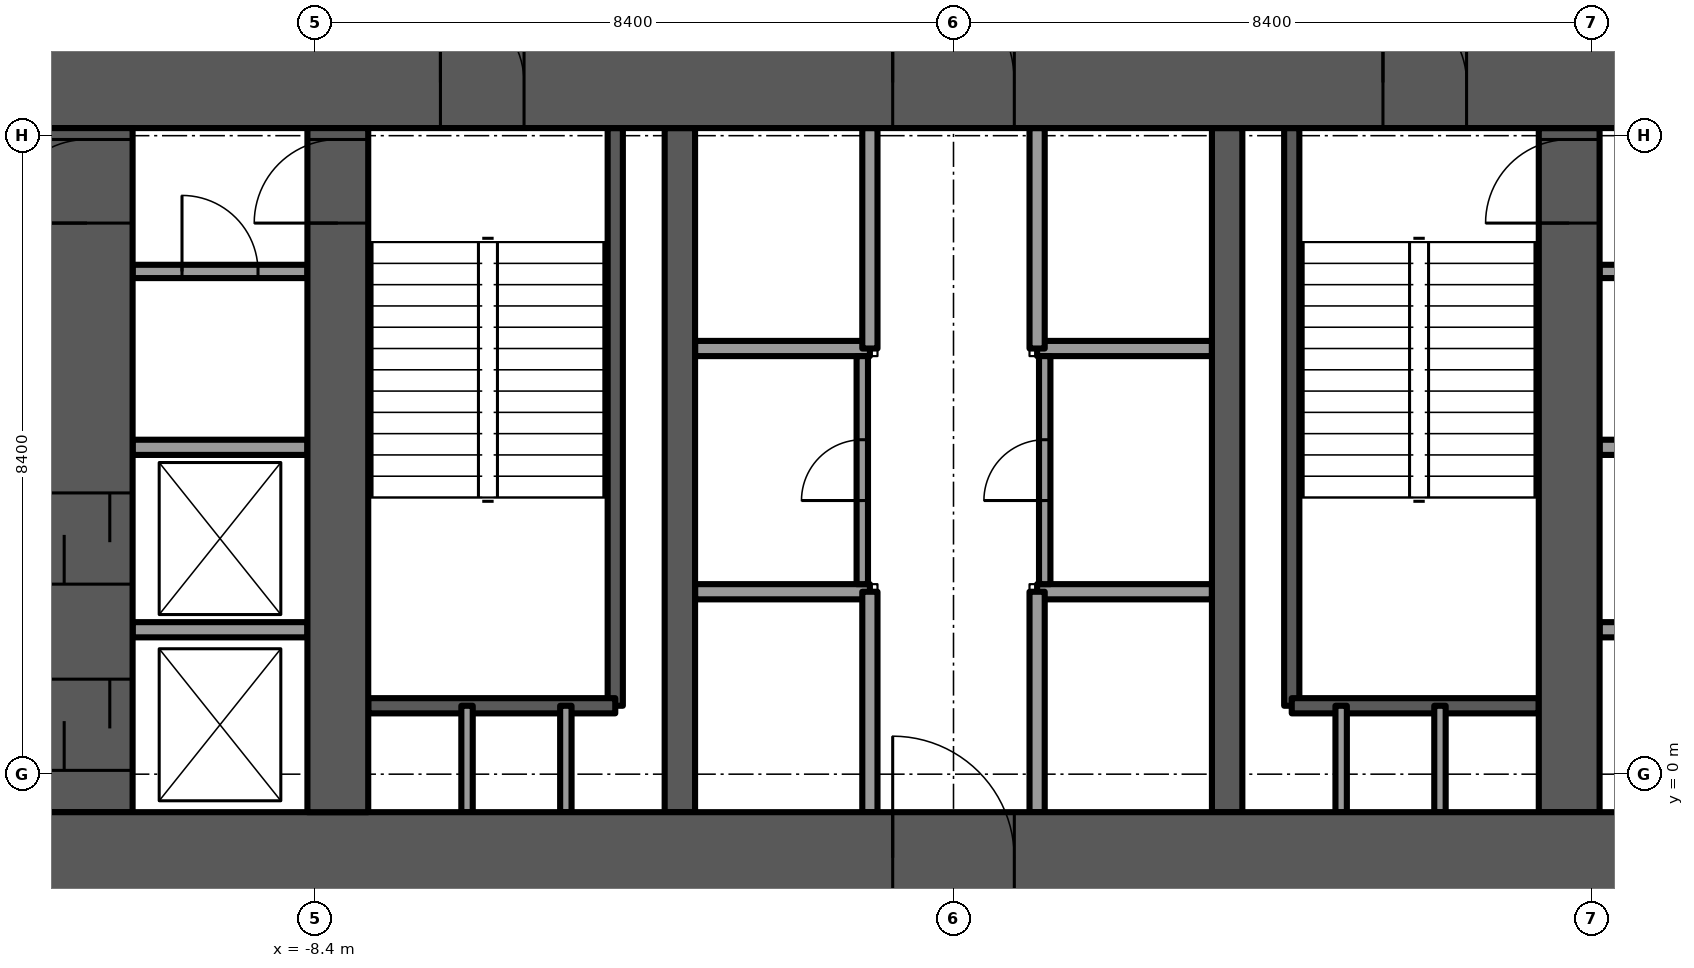
"""IFC4 building model, lengths in metres.
Left out: names, types, materials, properties, quantities, classifications, styles, units other than length and angle.
Written with IfcOpenShell. Run it as: python <this file> out.ifc"""

import sys

from ifc_helpers import new_model, si_unit, direction, frame, frame_2d, origin, place, context, subcontext, project, spatial, rectangle, extrude, element, fill, save


model = new_model("IFC4")
c1 = context("Model", 3, precision=1e-05, world=origin(), true_north=direction((0.0, 1.0)))
c2 = subcontext(c1, "Body", "Model", "MODEL_VIEW")
j1 = project(units=[si_unit("LENGTHUNIT", "METRE"), si_unit("PLANEANGLEUNIT", "RADIAN")], contexts=[c1])
p1 = place(None, origin())
s1 = spatial("IfcSite", under=j1, at=p1, CompositionType="ELEMENT")
p2 = place(p1, origin())
s2 = spatial("IfcBuilding", under=s1, at=p2, CompositionType="ELEMENT")
p3 = place(p2, frame((0.0, 0.0, 14.5)))
s3 = spatial("IfcBuildingStorey", under=s2, at=p3, CompositionType="ELEMENT", Elevation=14.5)
p4 = place(p3, frame((-12.0, -1.1, -0.3), z_axis=(0.0, 0.0, 1.0), x_axis=(1.0, 0.0, 0.0)))
e1 = element("IfcWall", 1, at=p4, inside=s3, PredefinedType="SHEAR", context=c2, shape_type="SweptSolid", body=[
    extrude(rectangle(XDim=24.0, YDim=1.2, at=frame_2d((12.0, 0.0))), origin(), (0.0, 0.0, 1.0), 4.5),
])
p5 = place(p4, frame((11.2, 0.0, 0.0)))
e2 = element("IfcOpeningElement", 2, at=p5, cuts=e1, PredefinedType="OPENING", context=c2, shape_type="SweptSolid", body=[
    extrude(rectangle(XDim=1.6, YDim=2.1, at=frame_2d((0.8, 1.05))), frame((0.0, 0.6, 0.0), z_axis=(0.0, -1.0, 0.0), x_axis=(1.0, 0.0, 0.0)), (0.0, 0.0, 1.0), 1.2),
])
p6 = place(p3, frame((-12.0, 9.1, -0.3), z_axis=(0.0, 0.0, 1.0), x_axis=(1.0, 0.0, 0.0)))
e3 = element("IfcWall", 3, at=p6, inside=s3, PredefinedType="SHEAR", context=c2, shape_type="SweptSolid", body=[
    extrude(rectangle(XDim=24.0, YDim=1.2, at=frame_2d((12.0, 0.0))), origin(), (0.0, 0.0, 1.0), 4.5),
])
p7 = place(p6, frame((11.2, 0.0, 0.0)))
e4 = element("IfcOpeningElement", 4, at=p7, cuts=e3, PredefinedType="OPENING", context=c2, shape_type="SweptSolid", body=[
    extrude(rectangle(XDim=1.6, YDim=2.1, at=frame_2d((0.8, 1.05))), frame((0.0, 0.6, 0.0), z_axis=(0.0, -1.0, 0.0), x_axis=(1.0, 0.0, 0.0)), (0.0, 0.0, 1.0), 1.2),
])
p8 = place(p6, frame((5.25, 0.0, 0.0)))
e5 = element("IfcOpeningElement", 5, at=p8, cuts=e3, PredefinedType="OPENING", context=c2, shape_type="SweptSolid", body=[
    extrude(rectangle(XDim=1.1, YDim=2.1, at=frame_2d((0.55, 1.05))), frame((0.0, 0.6, 0.0), z_axis=(0.0, -1.0, 0.0), x_axis=(1.0, 0.0, 0.0)), (0.0, 0.0, 1.0), 1.2),
])
p9 = place(p6, frame((17.65, 0.0, 0.0)))
e6 = element("IfcOpeningElement", 6, at=p9, cuts=e3, PredefinedType="OPENING", context=c2, shape_type="SweptSolid", body=[
    extrude(rectangle(XDim=1.1, YDim=2.1, at=frame_2d((0.55, 1.05))), frame((0.0, 0.6, 0.0), z_axis=(0.0, -1.0, 0.0), x_axis=(1.0, 0.0, 0.0)), (0.0, 0.0, 1.0), 1.2),
])
p10 = place(p3, frame((-8.1, -0.5, -0.3), z_axis=(0.0, 0.0, 1.0), x_axis=(0.0, 1.0, 0.0)))
e7 = element("IfcWall", 7, at=p10, inside=s3, PredefinedType="SHEAR", context=c2, shape_type="SweptSolid", body=[
    extrude(rectangle(XDim=9.0, YDim=0.8, at=frame_2d((4.5, 0.0))), origin(), (0.0, 0.0, 1.0), 4.5),
])
p11 = place(p10, frame((7.75, 0.0, 0.0)))
e8 = element("IfcOpeningElement", 8, at=p11, cuts=e7, PredefinedType="OPENING", context=c2, shape_type="SweptSolid", body=[
    extrude(rectangle(XDim=1.1, YDim=2.1, at=frame_2d((0.55, 1.05))), frame((0.0, 0.4, 0.0), z_axis=(0.0, -1.0, 0.0), x_axis=(1.0, 0.0, 0.0)), (0.0, 0.0, 1.0), 0.8),
])
p12 = place(p3, frame((8.1, -0.5, -0.3), z_axis=(0.0, 0.0, 1.0), x_axis=(0.0, 1.0, 0.0)))
e9 = element("IfcWall", 9, at=p12, inside=s3, PredefinedType="SHEAR", context=c2, shape_type="SweptSolid", body=[
    extrude(rectangle(XDim=9.0, YDim=0.8, at=frame_2d((4.5, 0.0))), origin(), (0.0, 0.0, 1.0), 4.5),
])
p13 = place(p12, frame((7.75, 0.0, 0.0)))
e10 = element("IfcOpeningElement", 10, at=p13, cuts=e9, PredefinedType="OPENING", context=c2, shape_type="SweptSolid", body=[
    extrude(rectangle(XDim=1.1, YDim=2.1, at=frame_2d((0.55, 1.05))), frame((0.0, 0.4, 0.0), z_axis=(0.0, -1.0, 0.0), x_axis=(1.0, 0.0, 0.0)), (0.0, 0.0, 1.0), 0.8),
])
for number, where, z_axis, x_axis in (
    (11, (-3.6, -0.5, -0.3), (0.0, 0.0, 1.0), (0.0, 1.0, 0.0)),
    (12, (3.6, -0.5, -0.3), (0.0, 0.0, 1.0), (0.0, 1.0, 0.0)),
):
    element("IfcWall", number, at=place(p3, frame(where, z_axis=z_axis, x_axis=x_axis)), inside=s3, PredefinedType="SHEAR", context=c2, shape_type="SweptSolid", body=[
        extrude(rectangle(XDim=9.0, YDim=0.4, at=frame_2d((4.5, 0.0))), origin(), (0.0, 0.0, 1.0), 4.5),
    ])
p14 = place(p3, frame((-11.4, -0.5, -0.3), z_axis=(0.0, 0.0, 1.0), x_axis=(0.0, 1.0, 0.0)))
e13 = element("IfcWall", 13, at=p14, inside=s3, PredefinedType="SHEAR", context=c2, shape_type="SweptSolid", body=[
    extrude(rectangle(XDim=9.0, YDim=1.2, at=frame_2d((4.5, 0.0))), origin(), (0.0, 0.0, 1.0), 4.5),
])
p15 = place(p14, frame((7.75, 0.0, 0.0)))
e14 = element("IfcOpeningElement", 14, at=p15, cuts=e13, PredefinedType="OPENING", context=c2, shape_type="SweptSolid", body=[
    extrude(rectangle(XDim=1.1, YDim=2.1, at=frame_2d((0.55, 1.05))), frame((0.0, 0.6, 0.0), z_axis=(0.0, -1.0, 0.0), x_axis=(1.0, 0.0, 0.0)), (0.0, 0.0, 1.0), 1.2),
])
p16 = place(p14, frame((0.55, 0.0, 0.0)))
e15 = element("IfcOpeningElement", 15, at=p16, cuts=e13, PredefinedType="OPENING", context=c2, shape_type="SweptSolid", body=[
    extrude(rectangle(XDim=1.2, YDim=2.1, at=frame_2d((0.6, 1.05))), frame((0.0, 0.6, 0.0), z_axis=(0.0, -1.0, 0.0), x_axis=(1.0, 0.0, 0.0)), (0.0, 0.0, 1.0), 1.2),
])
p17 = place(p14, frame((3.0, 0.0, 0.0)))
e16 = element("IfcOpeningElement", 16, at=p17, cuts=e13, PredefinedType="OPENING", context=c2, shape_type="SweptSolid", body=[
    extrude(rectangle(XDim=1.2, YDim=2.1, at=frame_2d((0.6, 1.05))), frame((0.0, 0.6, 0.0), z_axis=(0.0, -1.0, 0.0), x_axis=(1.0, 0.0, 0.0)), (0.0, 0.0, 1.0), 1.2),
])
for number, where, z_axis, x_axis in (
    (17, (-3.4, 2.4, 0.0), (0.0, 0.0, 1.0), (1.0, 0.0, 0.0)),
    (18, (-3.4, 5.6, 0.0), (0.0, 0.0, 1.0), (1.0, 0.0, 0.0)),
    (19, (1.1, 2.4, 0.0), (0.0, 0.0, 1.0), (1.0, 0.0, 0.0)),
    (20, (1.1, 5.6, 0.0), (0.0, 0.0, 1.0), (1.0, 0.0, 0.0)),
):
    element("IfcWall", number, at=place(p3, frame(where, z_axis=z_axis, x_axis=x_axis)), inside=s3, PredefinedType="PARTITIONING", context=c2, shape_type="SweptSolid", body=[
        extrude(rectangle(XDim=2.3, YDim=0.2, at=frame_2d((1.15, 0.0))), origin(), (0.0, 0.0, 1.0), 4.2),
    ])
for number, where, z_axis, x_axis in (
    (21, (-1.1, -0.5, 0.0), (0.0, 0.0, 1.0), (0.0, 1.0, 0.0)),
    (22, (1.1, -0.5, 0.0), (0.0, 0.0, 1.0), (0.0, 1.0, 0.0)),
    (23, (-1.1, 5.6, 0.0), (0.0, 0.0, 1.0), (0.0, 1.0, 0.0)),
    (24, (1.1, 5.6, 0.0), (0.0, 0.0, 1.0), (0.0, 1.0, 0.0)),
):
    element("IfcWall", number, at=place(p3, frame(where, z_axis=z_axis, x_axis=x_axis)), inside=s3, PredefinedType="PARTITIONING", context=c2, shape_type="SweptSolid", body=[
        extrude(rectangle(XDim=2.9, YDim=0.2, at=frame_2d((1.45, 0.0))), origin(), (0.0, 0.0, 1.0), 4.2),
    ])
p18 = place(p3, frame((-4.45, 0.9, -0.3), z_axis=(0.0, 0.0, 1.0), x_axis=(0.0, 1.0, 0.0)))
e25 = element("IfcWall", 25, at=p18, inside=s3, PredefinedType="SOLIDWALL", context=c2, shape_type="SweptSolid", body=[
    extrude(rectangle(XDim=7.6, YDim=0.2, at=frame_2d((3.8, 0.0))), origin(), (0.0, 0.0, 1.0), 4.5),
])
p19 = place(p3, frame((-7.7, 0.9, -0.3), z_axis=(0.0, 0.0, 1.0), x_axis=(1.0, 0.0, 0.0)))
e26 = element("IfcWall", 26, at=p19, inside=s3, PredefinedType="SOLIDWALL", context=c2, shape_type="SweptSolid", body=[
    extrude(rectangle(XDim=3.25, YDim=0.2, at=frame_2d((1.625, 0.0))), origin(), (0.0, 0.0, 1.0), 4.5),
])
for number, where, z_axis, x_axis in (
    (27, (-6.4, -0.5, 0.0), (0.0, 0.0, 1.0), (0.0, 1.0, 0.0)),
    (28, (-5.1, -0.5, 0.0), (0.0, 0.0, 1.0), (0.0, 1.0, 0.0)),
):
    element("IfcWall", number, at=place(p3, frame(where, z_axis=z_axis, x_axis=x_axis)), inside=s3, PredefinedType="PARTITIONING", context=c2, shape_type="SweptSolid", body=[
        extrude(rectangle(XDim=1.4, YDim=0.15, at=frame_2d((0.7, 0.0))), origin(), (0.0, 0.0, 1.0), 4.2),
    ])
p20 = place(p3, frame((4.45, 0.9, -0.3), z_axis=(0.0, 0.0, 1.0), x_axis=(0.0, 1.0, 0.0)))
e29 = element("IfcWall", 29, at=p20, inside=s3, PredefinedType="SOLIDWALL", context=c2, shape_type="SweptSolid", body=[
    extrude(rectangle(XDim=7.6, YDim=0.2, at=frame_2d((3.8, 0.0))), origin(), (0.0, 0.0, 1.0), 4.5),
])
p21 = place(p3, frame((4.45, 0.9, -0.3), z_axis=(0.0, 0.0, 1.0), x_axis=(1.0, 0.0, 0.0)))
e30 = element("IfcWall", 30, at=p21, inside=s3, PredefinedType="SOLIDWALL", context=c2, shape_type="SweptSolid", body=[
    extrude(rectangle(XDim=3.25, YDim=0.2, at=frame_2d((1.625, 0.0))), origin(), (0.0, 0.0, 1.0), 4.5),
])
for number, where, z_axis, x_axis in (
    (31, (5.1, -0.5, 0.0), (0.0, 0.0, 1.0), (0.0, 1.0, 0.0)),
    (32, (6.4, -0.5, 0.0), (0.0, 0.0, 1.0), (0.0, 1.0, 0.0)),
):
    element("IfcWall", number, at=place(p3, frame(where, z_axis=z_axis, x_axis=x_axis)), inside=s3, PredefinedType="PARTITIONING", context=c2, shape_type="SweptSolid", body=[
        extrude(rectangle(XDim=1.4, YDim=0.15, at=frame_2d((0.7, 0.0))), origin(), (0.0, 0.0, 1.0), 4.2),
    ])
p22 = place(p3, frame((-1.2, 2.5, 0.0), z_axis=(0.0, 0.0, 1.0), x_axis=(0.0, 1.0, 0.0)))
e33 = element("IfcWall", 33, at=p22, inside=s3, PredefinedType="PARTITIONING", context=c2, shape_type="SweptSolid", body=[
    extrude(rectangle(XDim=3.0, YDim=0.15, at=frame_2d((1.5, 0.0))), origin(), (0.0, 0.0, 1.0), 4.2),
])
p23 = place(p22, frame((1.1, 0.0, 0.0)))
e34 = element("IfcOpeningElement", 34, at=p23, cuts=e33, PredefinedType="OPENING", context=c2, shape_type="SweptSolid", body=[
    extrude(rectangle(XDim=0.8, YDim=2.1, at=frame_2d((0.4, 1.05))), frame((0.0, 0.075, 0.0), z_axis=(0.0, -1.0, 0.0), x_axis=(1.0, 0.0, 0.0)), (0.0, 0.0, 1.0), 0.15),
])
p24 = place(p3, frame((1.2, 2.5, 0.0), z_axis=(0.0, 0.0, 1.0), x_axis=(0.0, 1.0, 0.0)))
e35 = element("IfcWall", 35, at=p24, inside=s3, PredefinedType="PARTITIONING", context=c2, shape_type="SweptSolid", body=[
    extrude(rectangle(XDim=3.0, YDim=0.15, at=frame_2d((1.5, 0.0))), origin(), (0.0, 0.0, 1.0), 4.2),
])
p25 = place(p24, frame((1.1, 0.0, 0.0)))
e36 = element("IfcOpeningElement", 36, at=p25, cuts=e35, PredefinedType="OPENING", context=c2, shape_type="SweptSolid", body=[
    extrude(rectangle(XDim=0.8, YDim=2.1, at=frame_2d((0.4, 1.05))), frame((0.0, 0.075, 0.0), z_axis=(0.0, -1.0, 0.0), x_axis=(1.0, 0.0, 0.0)), (0.0, 0.0, 1.0), 0.15),
])
for number, where, z_axis, x_axis in (
    (37, (-10.8, 1.9, 0.0), (0.0, 0.0, 1.0), (1.0, 0.0, 0.0)),
    (38, (-10.8, 4.3, 0.0), (0.0, 0.0, 1.0), (1.0, 0.0, 0.0)),
):
    element("IfcWall", number, at=place(p3, frame(where, z_axis=z_axis, x_axis=x_axis)), inside=s3, PredefinedType="PARTITIONING", context=c2, shape_type="SweptSolid", body=[
        extrude(rectangle(XDim=2.3, YDim=0.2, at=frame_2d((1.15, 0.0))), origin(), (0.0, 0.0, 1.0), 4.2),
    ])
p26 = place(p3, frame((-10.8, 6.614, 0.0), z_axis=(0.0, 0.0, 1.0), x_axis=(1.0, 0.0, 0.0)))
e39 = element("IfcWall", 39, at=p26, inside=s3, PredefinedType="PARTITIONING", context=c2, shape_type="SweptSolid", body=[
    extrude(rectangle(XDim=2.3, YDim=0.175, at=frame_2d((1.15, 0.0))), origin(), (0.0, 0.0, 1.0), 4.2),
])
p27 = place(p26, frame((0.65, 0.0, 0.0)))
e40 = element("IfcOpeningElement", 40, at=p27, cuts=e39, PredefinedType="OPENING", context=c2, shape_type="SweptSolid", body=[
    extrude(rectangle(XDim=1.0, YDim=2.1, at=frame_2d((0.5, 1.05))), frame((0.0, 0.087, 0.0), z_axis=(0.0, -1.0, 0.0), x_axis=(1.0, 0.0, 0.0)), (0.0, 0.0, 1.0), 0.175),
])
for number, where, z_axis, x_axis in (
    (41, (8.5, 1.9, 0.0), (0.0, 0.0, 1.0), (1.0, 0.0, 0.0)),
    (42, (8.5, 4.3, 0.0), (0.0, 0.0, 1.0), (1.0, 0.0, 0.0)),
):
    element("IfcWall", number, at=place(p3, frame(where, z_axis=z_axis, x_axis=x_axis)), inside=s3, PredefinedType="PARTITIONING", context=c2, shape_type="SweptSolid", body=[
        extrude(rectangle(XDim=2.3, YDim=0.2, at=frame_2d((1.15, 0.0))), origin(), (0.0, 0.0, 1.0), 4.2),
    ])
p28 = place(p3, frame((8.5, 6.614, 0.0), z_axis=(0.0, 0.0, 1.0), x_axis=(1.0, 0.0, 0.0)))
e43 = element("IfcWall", 43, at=p28, inside=s3, PredefinedType="PARTITIONING", context=c2, shape_type="SweptSolid", body=[
    extrude(rectangle(XDim=2.3, YDim=0.175, at=frame_2d((1.15, 0.0))), origin(), (0.0, 0.0, 1.0), 4.2),
])
p29 = place(p28, frame((0.65, 0.0, 0.0)))
e44 = element("IfcOpeningElement", 44, at=p29, cuts=e43, PredefinedType="OPENING", context=c2, shape_type="SweptSolid", body=[
    extrude(rectangle(XDim=1.0, YDim=2.1, at=frame_2d((0.5, 1.05))), frame((0.0, 0.087, 0.0), z_axis=(0.0, -1.0, 0.0), x_axis=(1.0, 0.0, 0.0)), (0.0, 0.0, 1.0), 0.175),
])
p30 = place(p5, origin())
e45 = element("IfcDoor", 45, at=p30, inside=s3, OperationType="DOUBLE_DOOR_SINGLE_SWING", PredefinedType="DOOR", context=c2, shape_type="SweptSolid", body=[
    extrude(rectangle(XDim=1.6, YDim=2.1, at=frame_2d((0.8, 1.05))), frame((0.0, 0.025, 0.0), z_axis=(0.0, -1.0, 0.0), x_axis=(1.0, 0.0, 0.0)), (0.0, 0.0, 1.0), 0.05),
])
fill(e2, e45)
p31 = place(p7, origin())
e46 = element("IfcDoor", 46, at=p31, inside=s3, OperationType="DOUBLE_DOOR_SINGLE_SWING", PredefinedType="DOOR", context=c2, shape_type="SweptSolid", body=[
    extrude(rectangle(XDim=1.6, YDim=2.1, at=frame_2d((0.8, 1.05))), frame((0.0, 0.025, 0.0), z_axis=(0.0, -1.0, 0.0), x_axis=(1.0, 0.0, 0.0)), (0.0, 0.0, 1.0), 0.05),
])
fill(e4, e46)
p32 = place(p8, origin())
e47 = element("IfcDoor", 47, at=p32, inside=s3, OperationType="SINGLE_SWING_LEFT", PredefinedType="DOOR", context=c2, shape_type="SweptSolid", body=[
    extrude(rectangle(XDim=1.1, YDim=2.1, at=frame_2d((0.55, 1.05))), frame((0.0, 0.025, 0.0), z_axis=(0.0, -1.0, 0.0), x_axis=(1.0, 0.0, 0.0)), (0.0, 0.0, 1.0), 0.05),
])
fill(e5, e47)
p33 = place(p11, origin())
e48 = element("IfcDoor", 48, at=p33, inside=s3, OperationType="SINGLE_SWING_RIGHT", PredefinedType="DOOR", context=c2, shape_type="SweptSolid", body=[
    extrude(rectangle(XDim=1.1, YDim=2.1, at=frame_2d((0.55, 1.05))), frame((0.0, 0.025, 0.0), z_axis=(0.0, -1.0, 0.0), x_axis=(1.0, 0.0, 0.0)), (0.0, 0.0, 1.0), 0.05),
])
fill(e8, e48)
p34 = place(p9, origin())
e49 = element("IfcDoor", 49, at=p34, inside=s3, OperationType="SINGLE_SWING_RIGHT", PredefinedType="DOOR", context=c2, shape_type="SweptSolid", body=[
    extrude(rectangle(XDim=1.1, YDim=2.1, at=frame_2d((0.55, 1.05))), frame((0.0, 0.025, 0.0), z_axis=(0.0, -1.0, 0.0), x_axis=(1.0, 0.0, 0.0)), (0.0, 0.0, 1.0), 0.05),
])
fill(e6, e49)
p35 = place(p13, origin())
e50 = element("IfcDoor", 50, at=p35, inside=s3, OperationType="SINGLE_SWING_LEFT", PredefinedType="DOOR", context=c2, shape_type="SweptSolid", body=[
    extrude(rectangle(XDim=1.1, YDim=2.1, at=frame_2d((0.55, 1.05))), frame((0.0, 0.025, 0.0), z_axis=(0.0, -1.0, 0.0), x_axis=(1.0, 0.0, 0.0)), (0.0, 0.0, 1.0), 0.05),
])
fill(e10, e50)
p36 = place(p23, origin())
e51 = element("IfcDoor", 51, at=p36, inside=s3, OperationType="SINGLE_SWING_LEFT", PredefinedType="DOOR", context=c2, shape_type="SweptSolid", body=[
    extrude(rectangle(XDim=0.8, YDim=2.1, at=frame_2d((0.4, 1.05))), frame((0.0, 0.025, 0.0), z_axis=(0.0, -1.0, 0.0), x_axis=(1.0, 0.0, 0.0)), (0.0, 0.0, 1.0), 0.05),
])
fill(e34, e51)
p37 = place(p25, origin())
e52 = element("IfcDoor", 52, at=p37, inside=s3, OperationType="SINGLE_SWING_RIGHT", PredefinedType="DOOR", context=c2, shape_type="SweptSolid", body=[
    extrude(rectangle(XDim=0.8, YDim=2.1, at=frame_2d((0.4, 1.05))), frame((0.0, 0.025, 0.0), z_axis=(0.0, -1.0, 0.0), x_axis=(1.0, 0.0, 0.0)), (0.0, 0.0, 1.0), 0.05),
])
fill(e36, e52)
p38 = place(p27, origin())
e53 = element("IfcDoor", 53, at=p38, inside=s3, OperationType="SINGLE_SWING_LEFT", PredefinedType="DOOR", context=c2, shape_type="SweptSolid", body=[
    extrude(rectangle(XDim=1.0, YDim=2.1, at=frame_2d((0.5, 1.05))), frame((0.0, 0.025, 0.0), z_axis=(0.0, -1.0, 0.0), x_axis=(1.0, 0.0, 0.0)), (0.0, 0.0, 1.0), 0.05),
])
fill(e40, e53)
p39 = place(p15, origin())
e54 = element("IfcDoor", 54, at=p39, inside=s3, OperationType="SINGLE_SWING_LEFT", PredefinedType="DOOR", context=c2, shape_type="SweptSolid", body=[
    extrude(rectangle(XDim=1.1, YDim=2.1, at=frame_2d((0.55, 1.05))), frame((0.0, 0.025, 0.0), z_axis=(0.0, -1.0, 0.0), x_axis=(1.0, 0.0, 0.0)), (0.0, 0.0, 1.0), 0.05),
])
fill(e14, e54)
p40 = place(p16, origin())
e55 = element("IfcDoor", 55, at=p40, inside=s3, OperationType="SLIDING_TO_LEFT", PredefinedType="DOOR", context=c2, shape_type="SweptSolid", body=[
    extrude(rectangle(XDim=1.2, YDim=2.1, at=frame_2d((0.6, 1.05))), frame((0.0, 0.025, 0.0), z_axis=(0.0, -1.0, 0.0), x_axis=(1.0, 0.0, 0.0)), (0.0, 0.0, 1.0), 0.05),
])
fill(e15, e55)
p41 = place(p17, origin())
e56 = element("IfcDoor", 56, at=p41, inside=s3, OperationType="SLIDING_TO_LEFT", PredefinedType="DOOR", context=c2, shape_type="SweptSolid", body=[
    extrude(rectangle(XDim=1.2, YDim=2.1, at=frame_2d((0.6, 1.05))), frame((0.0, 0.025, 0.0), z_axis=(0.0, -1.0, 0.0), x_axis=(1.0, 0.0, 0.0)), (0.0, 0.0, 1.0), 0.05),
])
fill(e16, e56)
save(model, sys.argv[1])
